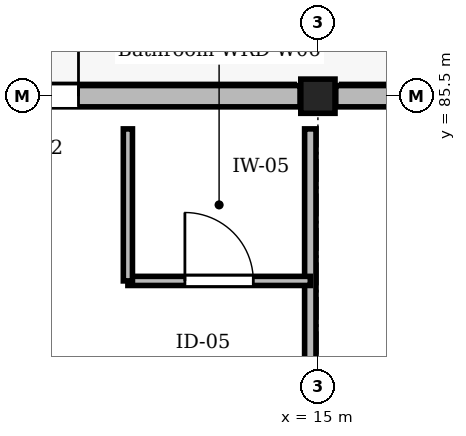
"""IFC4 building model, lengths in metres.
Left out: names, types, materials, properties, quantities, classifications, styles, units other than length and angle.
Written with IfcOpenShell. Run it as: python <this file> out.ifc"""

import sys

from ifc_helpers import new_model, si_unit, direction, frame, frame_2d, origin, origin_2d, place, context, subcontext, project, spatial, rectangle, extrude, element, fill, save


model = new_model("IFC4")
c1 = context("Model", 3, precision=1e-05, world=origin(), true_north=direction((0.0, 1.0)))
c2 = subcontext(c1, "Body", "Model", "MODEL_VIEW")
j1 = project(units=[si_unit("LENGTHUNIT", "METRE"), si_unit("PLANEANGLEUNIT", "RADIAN")], contexts=[c1])
p1 = place(None, origin())
s1 = spatial("IfcSite", under=j1, at=p1, CompositionType="ELEMENT")
p2 = place(p1, origin())
s2 = spatial("IfcBuilding", under=s1, at=p2, CompositionType="ELEMENT")
p3 = place(p2, frame((0.0, 0.0, 25.95)))
s3 = spatial("IfcBuildingStorey", under=s2, at=p3, CompositionType="ELEMENT", Elevation=25.95)
p4 = place(p3, frame((15.0, 85.5, 0.0), z_axis=(0.0, 0.0, 1.0), x_axis=(1.0, 0.0, 0.0)))
e1 = element("IfcColumn", 1, at=p4, inside=s3, PredefinedType="COLUMN", context=c2, shape_type="SweptSolid", body=[
    extrude(rectangle(XDim=0.45, YDim=0.45, at=origin_2d()), origin(), (0.0, 0.0, 1.0), 4.05),
])
p5 = place(p3, frame((7.735, 85.5, 0.0), z_axis=(0.0, 0.0, 1.0), x_axis=(1.0, 0.0, 0.0)))
e2 = element("IfcWall", 2, at=p5, inside=s3, PredefinedType="STANDARD", context=c2, shape_type="SweptSolid", body=[
    extrude(rectangle(XDim=7.03, YDim=0.28, at=frame_2d((3.515, 0.0))), origin(), (0.0, 0.0, 1.0), 3.17),
])
p6 = place(p5, frame((2.915, 0.0, 0.0)))
e3 = element("IfcOpeningElement", 3, at=p6, cuts=e2, PredefinedType="OPENING", context=c2, shape_type="SweptSolid", body=[
    extrude(rectangle(XDim=1.2, YDim=2.3, at=frame_2d((0.6, 1.15))), frame((0.0, 0.15, 0.0), z_axis=(0.0, -1.0, 0.0), x_axis=(1.0, 0.0, 0.0)), (0.0, 0.0, 1.0), 0.3),
])
p7 = place(p3, frame((15.235, 85.5, 0.0), z_axis=(0.0, 0.0, 1.0), x_axis=(1.0, 0.0, 0.0)))
e4 = element("IfcWall", 4, at=p7, inside=s3, PredefinedType="STANDARD", context=c2, shape_type="SweptSolid", body=[
    extrude(rectangle(XDim=7.03, YDim=0.28, at=frame_2d((3.515, 0.0))), origin(), (0.0, 0.0, 1.0), 3.17),
])
p8 = place(p7, frame((2.715, 0.0, 0.0)))
e5 = element("IfcOpeningElement", 5, at=p8, cuts=e4, PredefinedType="OPENING", context=c2, shape_type="SweptSolid", body=[
    extrude(rectangle(XDim=1.6, YDim=2.35, at=frame_2d((0.8, 1.175))), frame((0.0, 0.15, 0.0), z_axis=(0.0, -1.0, 0.0), x_axis=(1.0, 0.0, 0.0)), (0.0, 0.0, 1.0), 0.3),
])
p9 = place(p3, frame((14.9, 73.58, 0.0), z_axis=(0.0, 0.0, 1.0), x_axis=(0.0, 1.0, 0.0)))
e6 = element("IfcWall", 6, at=p9, inside=s3, PredefinedType="PARTITIONING", context=c2, shape_type="SweptSolid", body=[
    extrude(rectangle(XDim=11.49, YDim=0.15, at=frame_2d((5.745, 0.0))), origin(), (0.0, 0.0, 1.0), 3.055),
])
p10 = place(p9, frame((6.998, 0.0, 0.0)))
e7 = element("IfcOpeningElement", 7, at=p10, cuts=e6, PredefinedType="OPENING", context=c2, shape_type="SweptSolid", body=[
    extrude(rectangle(XDim=1.35, YDim=2.25, at=frame_2d((0.675, 1.125))), frame((0.0, 0.085, 0.0), z_axis=(0.0, -1.0, 0.0), x_axis=(1.0, 0.0, 0.0)), (0.0, 0.0, 1.0), 0.17),
])
p11 = place(p3, frame((12.5, 83.07, 0.0), z_axis=(0.0, 0.0, 1.0), x_axis=(1.0, 0.0, 0.0)))
e8 = element("IfcWall", 8, at=p11, inside=s3, PredefinedType="PARTITIONING", context=c2, shape_type="SweptSolid", body=[
    extrude(rectangle(XDim=2.4, YDim=0.12, at=frame_2d((1.2, 0.0))), origin(), (0.0, 0.0, 1.0), 3.755),
])
p12 = place(p11, frame((0.75, 0.0, 0.0)))
e9 = element("IfcOpeningElement", 9, at=p12, cuts=e8, PredefinedType="OPENING", context=c2, shape_type="SweptSolid", body=[
    extrude(rectangle(XDim=0.9, YDim=2.1, at=frame_2d((0.45, 1.05))), frame((0.0, 0.07, 0.0), z_axis=(0.0, -1.0, 0.0), x_axis=(1.0, 0.0, 0.0)), (0.0, 0.0, 1.0), 0.14),
])
p13 = place(p3, frame((12.5, 83.07, 0.0), z_axis=(0.0, 0.0, 1.0), x_axis=(0.0, 1.0, 0.0)))
e10 = element("IfcWall", 10, at=p13, inside=s3, PredefinedType="PARTITIONING", context=c2, shape_type="SweptSolid", body=[
    extrude(rectangle(XDim=2.0, YDim=0.12, at=frame_2d((1.0, 0.0))), origin(), (0.0, 0.0, 1.0), 3.755),
])
p14 = place(p6, origin())
e11 = element("IfcDoor", 11, at=p14, inside=s3, OperationType="SINGLE_SWING_RIGHT", PredefinedType="DOOR", context=c2, shape_type="SweptSolid", body=[
    extrude(rectangle(XDim=1.2, YDim=2.3, at=frame_2d((0.6, 1.15))), frame((0.0, 0.025, 0.0), z_axis=(0.0, -1.0, 0.0), x_axis=(1.0, 0.0, 0.0)), (0.0, 0.0, 1.0), 0.05),
])
fill(e3, e11)
p15 = place(p12, origin())
e12 = element("IfcDoor", 12, at=p15, inside=s3, OperationType="SINGLE_SWING_LEFT", PredefinedType="DOOR", context=c2, shape_type="SweptSolid", body=[
    extrude(rectangle(XDim=0.9, YDim=2.1, at=frame_2d((0.45, 1.05))), frame((0.0, 0.025, 0.0), z_axis=(0.0, -1.0, 0.0), x_axis=(1.0, 0.0, 0.0)), (0.0, 0.0, 1.0), 0.05),
])
fill(e9, e12)
save(model, sys.argv[1])
